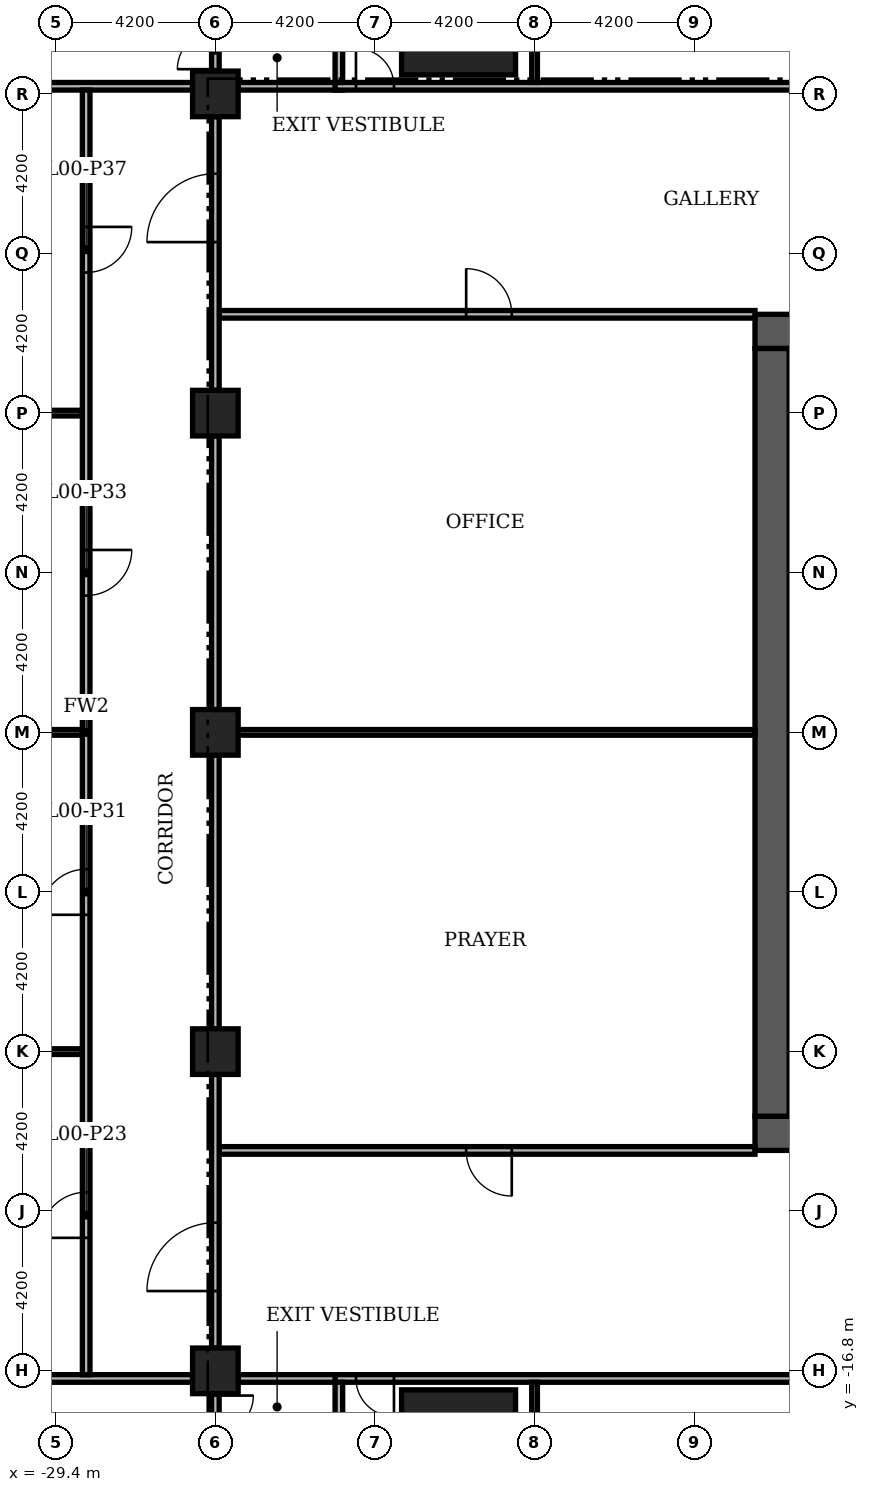
"""IFC4 building model, lengths in metres.
Left out: names, types, materials, properties, quantities, classifications, styles, units other than length and angle.
Written with IfcOpenShell. Run it as: python <this file> out.ifc"""

import sys

from ifc_helpers import new_model, si_unit, direction, frame, frame_2d, origin, origin_2d, place, context, subcontext, project, spatial, rectangle, extrude, element, fill, save


model = new_model("IFC4")
c1 = context("Model", 3, precision=1e-05, world=origin(), true_north=direction((0.0, 1.0)))
c2 = subcontext(c1, "Body", "Model", "MODEL_VIEW")
j1 = project(units=[si_unit("LENGTHUNIT", "METRE"), si_unit("PLANEANGLEUNIT", "RADIAN")], contexts=[c1])
p1 = place(None, origin())
s1 = spatial("IfcSite", under=j1, at=p1, CompositionType="ELEMENT")
p2 = place(p1, origin())
s2 = spatial("IfcBuilding", under=s1, at=p2, CompositionType="ELEMENT")
p3 = place(p2, origin())
s3 = spatial("IfcBuildingStorey", under=s2, at=p3, CompositionType="ELEMENT", Elevation=0.0)
p4 = place(p3, frame((-11.0, -10.55, 0.0), z_axis=(0.0, 0.0, 1.0), x_axis=(1.0, 0.0, 0.0)))
e1 = element("IfcWall", 1, at=p4, inside=s3, PredefinedType="SHEAR", context=c2, shape_type="SweptSolid", body=[
    extrude(rectangle(XDim=22.0, YDim=0.9, at=frame_2d((11.0, 0.0))), origin(), (0.0, 0.0, 1.0), 6.78),
])
p5 = place(p4, frame((7.4, 0.0, 0.0)))
e2 = element("IfcOpeningElement", 2, at=p5, cuts=e1, PredefinedType="OPENING", context=c2, shape_type="SweptSolid", body=[
    extrude(rectangle(XDim=1.8, YDim=2.2, at=frame_2d((0.9, 1.1))), frame((0.0, 0.46, 0.0), z_axis=(0.0, -1.0, 0.0), x_axis=(1.0, 0.0, 0.0)), (0.0, 0.0, 1.0), 0.92),
])
p6 = place(p3, frame((-11.0, 10.55, 0.0), z_axis=(0.0, 0.0, 1.0), x_axis=(1.0, 0.0, 0.0)))
e3 = element("IfcWall", 3, at=p6, inside=s3, PredefinedType="SHEAR", context=c2, shape_type="SweptSolid", body=[
    extrude(rectangle(XDim=22.0, YDim=0.9, at=frame_2d((11.0, 0.0))), origin(), (0.0, 0.0, 1.0), 6.78),
])
p7 = place(p6, frame((12.6, 0.0, 0.0)))
e4 = element("IfcOpeningElement", 4, at=p7, cuts=e3, PredefinedType="OPENING", context=c2, shape_type="SweptSolid", body=[
    extrude(rectangle(XDim=1.2, YDim=2.2, at=frame_2d((0.6, 1.1))), frame((0.0, 0.46, 0.0), z_axis=(0.0, -1.0, 0.0), x_axis=(1.0, 0.0, 0.0)), (0.0, 0.0, 1.0), 0.92),
])
p8 = place(p6, frame((14.8, 0.0, 0.0)))
e5 = element("IfcOpeningElement", 5, at=p8, cuts=e3, PredefinedType="OPENING", context=c2, shape_type="SweptSolid", body=[
    extrude(rectangle(XDim=1.2, YDim=2.2, at=frame_2d((0.6, 1.1))), frame((0.0, 0.46, 0.0), z_axis=(0.0, -1.0, 0.0), x_axis=(1.0, 0.0, 0.0)), (0.0, 0.0, 1.0), 0.92),
])
p9 = place(p3, frame((-10.55, -10.1, 0.0), z_axis=(0.0, 0.0, 1.0), x_axis=(0.0, 1.0, 0.0)))
e6 = element("IfcWall", 6, at=p9, inside=s3, PredefinedType="SHEAR", context=c2, shape_type="SweptSolid", body=[
    extrude(rectangle(XDim=20.2, YDim=0.9, at=frame_2d((10.1, 0.0))), origin(), (0.0, 0.0, 1.0), 6.78),
])
for number, where, z_axis, x_axis in (
    (7, (-18.8, 18.8, 0.0), (0.0, 0.0, 1.0), (1.0, 0.0, 0.0)),
    (8, (-18.8, -18.8, 0.0), (0.0, 0.0, 1.0), (1.0, 0.0, 0.0)),
):
    element("IfcColumn", number, at=place(p3, frame(where, z_axis=z_axis, x_axis=x_axis)), inside=s3, PredefinedType="COLUMN", context=c2, shape_type="SweptSolid", body=[
        extrude(rectangle(XDim=3.0, YDim=3.0, at=origin_2d()), origin(), (0.0, 0.0, 1.0), 7.2),
    ])
for number, where, z_axis, x_axis in (
    (9, (-25.2, 0.0, 0.0), (0.0, 0.0, 1.0), (1.0, 0.0, 0.0)),
    (10, (-25.2, -8.4, 0.0), (0.0, 0.0, 1.0), (1.0, 0.0, 0.0)),
    (11, (-25.2, -16.8, 0.0), (0.0, 0.0, 1.0), (1.0, 0.0, 0.0)),
    (12, (-25.2, 8.4, 0.0), (0.0, 0.0, 1.0), (1.0, 0.0, 0.0)),
    (13, (-25.2, 16.8, 0.0), (0.0, 0.0, 1.0), (1.0, 0.0, 0.0)),
):
    element("IfcColumn", number, at=place(p3, frame(where, z_axis=z_axis, x_axis=x_axis)), inside=s3, PredefinedType="COLUMN", context=c2, shape_type="SweptSolid", body=[
        extrude(rectangle(XDim=1.2, YDim=1.2, at=origin_2d()), origin(), (0.0, 0.0, 1.0), 7.2),
    ])
p10 = place(p3, frame((-33.0, -17.0, 0.0), z_axis=(0.0, 0.0, 1.0), x_axis=(1.0, 0.0, 0.0)))
e14 = element("IfcWall", 14, at=p10, inside=s3, PredefinedType="PARTITIONING", context=c2, shape_type="SweptSolid", body=[
    extrude(rectangle(XDim=7.2, YDim=0.2, at=frame_2d((3.6, 0.0))), origin(), (0.0, 0.0, 1.0), 6.48),
])
p11 = place(p3, frame((-24.6, -17.0, 0.0), z_axis=(0.0, 0.0, 1.0), x_axis=(1.0, 0.0, 0.0)))
e15 = element("IfcWall", 15, at=p11, inside=s3, PredefinedType="PARTITIONING", context=c2, shape_type="SweptSolid", body=[
    extrude(rectangle(XDim=2.75, YDim=0.2, at=frame_2d((1.375, 0.0))), origin(), (0.0, 0.0, 1.0), 6.78),
])
p12 = place(p3, frame((-22.05, -17.0, 0.0), z_axis=(0.0, 0.0, 1.0), x_axis=(1.0, 0.0, 0.0)))
e16 = element("IfcWall", 16, at=p12, inside=s3, PredefinedType="PARTITIONING", context=c2, shape_type="SweptSolid", body=[
    extrude(rectangle(XDim=44.1, YDim=0.2, at=frame_2d((22.05, 0.0))), origin(), (0.0, 0.0, 1.0), 6.78),
])
p13 = place(p12, frame((0.55, 0.0, 0.0)))
e17 = element("IfcOpeningElement", 17, at=p13, cuts=e16, PredefinedType="OPENING", context=c2, shape_type="SweptSolid", body=[
    extrude(rectangle(XDim=1.0, YDim=2.1, at=frame_2d((0.5, 1.05))), frame((0.0, 0.11, 0.0), z_axis=(0.0, -1.0, 0.0), x_axis=(1.0, 0.0, 0.0)), (0.0, 0.0, 1.0), 0.22),
])
p14 = place(p12, frame((12.85, 0.0, 0.0)))
e18 = element("IfcOpeningElement", 18, at=p14, cuts=e16, PredefinedType="OPENING", context=c2, shape_type="SweptSolid", body=[
    extrude(rectangle(XDim=2.4, YDim=2.4, at=frame_2d((1.2, 1.2))), frame((0.0, 0.11, 0.0), z_axis=(0.0, -1.0, 0.0), x_axis=(1.0, 0.0, 0.0)), (0.0, 0.0, 1.0), 0.22),
])
p15 = place(p12, frame((28.85, 0.0, 0.0)))
e19 = element("IfcOpeningElement", 19, at=p15, cuts=e16, PredefinedType="OPENING", context=c2, shape_type="SweptSolid", body=[
    extrude(rectangle(XDim=2.4, YDim=2.4, at=frame_2d((1.2, 1.2))), frame((0.0, 0.11, 0.0), z_axis=(0.0, -1.0, 0.0), x_axis=(1.0, 0.0, 0.0)), (0.0, 0.0, 1.0), 0.22),
])
p16 = place(p12, frame((42.55, 0.0, 0.0)))
e20 = element("IfcOpeningElement", 20, at=p16, cuts=e16, PredefinedType="OPENING", context=c2, shape_type="SweptSolid", body=[
    extrude(rectangle(XDim=1.0, YDim=2.1, at=frame_2d((0.5, 1.05))), frame((0.0, 0.11, 0.0), z_axis=(0.0, -1.0, 0.0), x_axis=(1.0, 0.0, 0.0)), (0.0, 0.0, 1.0), 0.22),
])
p17 = place(p3, frame((-25.1, -11.0, 0.0), z_axis=(0.0, 0.0, 1.0), x_axis=(1.0, 0.0, 0.0)))
e21 = element("IfcWall", 21, at=p17, inside=s3, PredefinedType="PARTITIONING", context=c2, shape_type="SweptSolid", body=[
    extrude(rectangle(XDim=14.1, YDim=0.2, at=frame_2d((7.05, 0.0))), origin(), (0.0, 0.0, 1.0), 6.78),
])
p18 = place(p17, frame((6.5, 0.0, 0.0)))
e22 = element("IfcOpeningElement", 22, at=p18, cuts=e21, PredefinedType="OPENING", context=c2, shape_type="SweptSolid", body=[
    extrude(rectangle(XDim=1.2, YDim=2.2, at=frame_2d((0.6, 1.1))), frame((0.0, 0.11, 0.0), z_axis=(0.0, -1.0, 0.0), x_axis=(1.0, 0.0, 0.0)), (0.0, 0.0, 1.0), 0.22),
])
for number, where, z_axis, x_axis in (
    (23, (-33.0, -8.4, 0.0), (0.0, 0.0, 1.0), (1.0, 0.0, 0.0)),
    (24, (-33.0, 0.0, 0.0), (0.0, 0.0, 1.0), (1.0, 0.0, 0.0)),
):
    element("IfcWall", number, at=place(p3, frame(where, z_axis=z_axis, x_axis=x_axis)), inside=s3, PredefinedType="PARTITIONING", context=c2, shape_type="SweptSolid", body=[
        extrude(rectangle(XDim=4.3, YDim=0.15, at=frame_2d((2.15, 0.0))), origin(), (0.0, 0.0, 1.0), 6.48),
    ])
p19 = place(p3, frame((-24.6, 0.0, 0.0), z_axis=(0.0, 0.0, 1.0), x_axis=(1.0, 0.0, 0.0)))
e25 = element("IfcWall", 25, at=p19, inside=s3, PredefinedType="PARTITIONING", context=c2, shape_type="SweptSolid", body=[
    extrude(rectangle(XDim=13.6, YDim=0.15, at=frame_2d((6.8, 0.0))), origin(), (0.0, 0.0, 1.0), 6.78),
])
p20 = place(p3, frame((-33.0, 8.4, 0.0), z_axis=(0.0, 0.0, 1.0), x_axis=(1.0, 0.0, 0.0)))
e26 = element("IfcWall", 26, at=p20, inside=s3, PredefinedType="PARTITIONING", context=c2, shape_type="SweptSolid", body=[
    extrude(rectangle(XDim=4.3, YDim=0.15, at=frame_2d((2.15, 0.0))), origin(), (0.0, 0.0, 1.0), 6.48),
])
p21 = place(p3, frame((-25.1, 11.0, 0.0), z_axis=(0.0, 0.0, 1.0), x_axis=(1.0, 0.0, 0.0)))
e27 = element("IfcWall", 27, at=p21, inside=s3, PredefinedType="PARTITIONING", context=c2, shape_type="SweptSolid", body=[
    extrude(rectangle(XDim=14.1, YDim=0.2, at=frame_2d((7.05, 0.0))), origin(), (0.0, 0.0, 1.0), 6.78),
])
p22 = place(p21, frame((6.5, 0.0, 0.0)))
e28 = element("IfcOpeningElement", 28, at=p22, cuts=e27, PredefinedType="OPENING", context=c2, shape_type="SweptSolid", body=[
    extrude(rectangle(XDim=1.2, YDim=2.2, at=frame_2d((0.6, 1.1))), frame((0.0, 0.11, 0.0), z_axis=(0.0, -1.0, 0.0), x_axis=(1.0, 0.0, 0.0)), (0.0, 0.0, 1.0), 0.22),
])
p23 = place(p3, frame((-33.0, 17.0, 0.0), z_axis=(0.0, 0.0, 1.0), x_axis=(1.0, 0.0, 0.0)))
e29 = element("IfcWall", 29, at=p23, inside=s3, PredefinedType="PARTITIONING", context=c2, shape_type="SweptSolid", body=[
    extrude(rectangle(XDim=7.2, YDim=0.2, at=frame_2d((3.6, 0.0))), origin(), (0.0, 0.0, 1.0), 6.48),
])
p24 = place(p3, frame((-24.6, 17.0, 0.0), z_axis=(0.0, 0.0, 1.0), x_axis=(1.0, 0.0, 0.0)))
e30 = element("IfcWall", 30, at=p24, inside=s3, PredefinedType="PARTITIONING", context=c2, shape_type="SweptSolid", body=[
    extrude(rectangle(XDim=2.75, YDim=0.2, at=frame_2d((1.375, 0.0))), origin(), (0.0, 0.0, 1.0), 6.78),
])
p25 = place(p3, frame((-22.05, 17.0, 0.0), z_axis=(0.0, 0.0, 1.0), x_axis=(1.0, 0.0, 0.0)))
e31 = element("IfcWall", 31, at=p25, inside=s3, PredefinedType="PARTITIONING", context=c2, shape_type="SweptSolid", body=[
    extrude(rectangle(XDim=22.85, YDim=0.2, at=frame_2d((11.425, 0.0))), origin(), (0.0, 0.0, 1.0), 6.78),
])
p26 = place(p25, frame((0.55, 0.0, 0.0)))
e32 = element("IfcOpeningElement", 32, at=p26, cuts=e31, PredefinedType="OPENING", context=c2, shape_type="SweptSolid", body=[
    extrude(rectangle(XDim=1.0, YDim=2.1, at=frame_2d((0.5, 1.05))), frame((0.0, 0.11, 0.0), z_axis=(0.0, -1.0, 0.0), x_axis=(1.0, 0.0, 0.0)), (0.0, 0.0, 1.0), 0.22),
])
p27 = place(p25, frame((13.15, 0.0, 0.0)))
e33 = element("IfcOpeningElement", 33, at=p27, cuts=e31, PredefinedType="OPENING", context=c2, shape_type="SweptSolid", body=[
    extrude(rectangle(XDim=1.8, YDim=2.2, at=frame_2d((0.9, 1.1))), frame((0.0, 0.11, 0.0), z_axis=(0.0, -1.0, 0.0), x_axis=(1.0, 0.0, 0.0)), (0.0, 0.0, 1.0), 0.22),
])
p28 = place(p3, frame((-28.6, -16.9, 0.0), z_axis=(0.0, 0.0, 1.0), x_axis=(0.0, 1.0, 0.0)))
e34 = element("IfcWall", 34, at=p28, inside=s3, PredefinedType="PARTITIONING", context=c2, shape_type="SweptSolid", body=[
    extrude(rectangle(XDim=33.8, YDim=0.2, at=frame_2d((16.9, 0.0))), origin(), (0.0, 0.0, 1.0), 6.48),
])
p29 = place(p28, frame((3.6, 0.0, 0.0)))
e35 = element("IfcOpeningElement", 35, at=p29, cuts=e34, PredefinedType="OPENING", context=c2, shape_type="SweptSolid", body=[
    extrude(rectangle(XDim=1.2, YDim=2.2, at=frame_2d((0.6, 1.1))), frame((0.0, 0.11, 0.0), z_axis=(0.0, -1.0, 0.0), x_axis=(1.0, 0.0, 0.0)), (0.0, 0.0, 1.0), 0.22),
])
p30 = place(p28, frame((12.1, 0.0, 0.0)))
e36 = element("IfcOpeningElement", 36, at=p30, cuts=e34, PredefinedType="OPENING", context=c2, shape_type="SweptSolid", body=[
    extrude(rectangle(XDim=1.2, YDim=2.2, at=frame_2d((0.6, 1.1))), frame((0.0, 0.11, 0.0), z_axis=(0.0, -1.0, 0.0), x_axis=(1.0, 0.0, 0.0)), (0.0, 0.0, 1.0), 0.22),
])
p31 = place(p28, frame((20.5, 0.0, 0.0)))
e37 = element("IfcOpeningElement", 37, at=p31, cuts=e34, PredefinedType="OPENING", context=c2, shape_type="SweptSolid", body=[
    extrude(rectangle(XDim=1.2, YDim=2.2, at=frame_2d((0.6, 1.1))), frame((0.0, 0.11, 0.0), z_axis=(0.0, -1.0, 0.0), x_axis=(1.0, 0.0, 0.0)), (0.0, 0.0, 1.0), 0.22),
])
p32 = place(p28, frame((29.0, 0.0, 0.0)))
e38 = element("IfcOpeningElement", 38, at=p32, cuts=e34, PredefinedType="OPENING", context=c2, shape_type="SweptSolid", body=[
    extrude(rectangle(XDim=1.2, YDim=2.2, at=frame_2d((0.6, 1.1))), frame((0.0, 0.11, 0.0), z_axis=(0.0, -1.0, 0.0), x_axis=(1.0, 0.0, 0.0)), (0.0, 0.0, 1.0), 0.22),
])
p33 = place(p3, frame((-25.2, -18.5, 0.0), z_axis=(0.0, 0.0, 1.0), x_axis=(0.0, 1.0, 0.0)))
e39 = element("IfcWall", 39, at=p33, inside=s3, PredefinedType="PARTITIONING", context=c2, shape_type="SweptSolid", body=[
    extrude(rectangle(XDim=1.1, YDim=0.2, at=frame_2d((0.55, 0.0))), origin(), (0.0, 0.0, 1.0), 6.38),
])
p34 = place(p33, frame((0.05, 0.0, 0.0)))
e40 = element("IfcOpeningElement", 40, at=p34, cuts=e39, PredefinedType="OPENING", context=c2, shape_type="SweptSolid", body=[
    extrude(rectangle(XDim=1.0, YDim=2.2, at=frame_2d((0.5, 1.1))), frame((0.0, 0.11, 0.0), z_axis=(0.0, -1.0, 0.0), x_axis=(1.0, 0.0, 0.0)), (0.0, 0.0, 1.0), 0.22),
])
p35 = place(p3, frame((-25.2, -16.2, 0.0), z_axis=(0.0, 0.0, 1.0), x_axis=(0.0, 1.0, 0.0)))
e41 = element("IfcWall", 41, at=p35, inside=s3, PredefinedType="PARTITIONING", context=c2, shape_type="SweptSolid", body=[
    extrude(rectangle(XDim=7.2, YDim=0.2, at=frame_2d((3.6, 0.0))), origin(), (0.0, 0.0, 1.0), 6.48),
])
p36 = place(p35, frame((1.5, 0.0, 0.0)))
e42 = element("IfcOpeningElement", 42, at=p36, cuts=e41, PredefinedType="OPENING", context=c2, shape_type="SweptSolid", body=[
    extrude(rectangle(XDim=1.8, YDim=2.2, at=frame_2d((0.9, 1.1))), frame((0.0, 0.11, 0.0), z_axis=(0.0, -1.0, 0.0), x_axis=(1.0, 0.0, 0.0)), (0.0, 0.0, 1.0), 0.22),
])
for number, where, z_axis, x_axis in (
    (43, (-25.2, -7.8, 0.0), (0.0, 0.0, 1.0), (0.0, 1.0, 0.0)),
    (44, (-25.2, 0.6, 0.0), (0.0, 0.0, 1.0), (0.0, 1.0, 0.0)),
):
    element("IfcWall", number, at=place(p3, frame(where, z_axis=z_axis, x_axis=x_axis)), inside=s3, PredefinedType="PARTITIONING", context=c2, shape_type="SweptSolid", body=[
        extrude(rectangle(XDim=7.2, YDim=0.2, at=frame_2d((3.6, 0.0))), origin(), (0.0, 0.0, 1.0), 6.48),
    ])
p37 = place(p3, frame((-25.2, 9.0, 0.0), z_axis=(0.0, 0.0, 1.0), x_axis=(0.0, 1.0, 0.0)))
e45 = element("IfcWall", 45, at=p37, inside=s3, PredefinedType="PARTITIONING", context=c2, shape_type="SweptSolid", body=[
    extrude(rectangle(XDim=7.2, YDim=0.2, at=frame_2d((3.6, 0.0))), origin(), (0.0, 0.0, 1.0), 6.48),
])
p38 = place(p37, frame((3.9, 0.0, 0.0)))
e46 = element("IfcOpeningElement", 46, at=p38, cuts=e45, PredefinedType="OPENING", context=c2, shape_type="SweptSolid", body=[
    extrude(rectangle(XDim=1.8, YDim=2.2, at=frame_2d((0.9, 1.1))), frame((0.0, 0.11, 0.0), z_axis=(0.0, -1.0, 0.0), x_axis=(1.0, 0.0, 0.0)), (0.0, 0.0, 1.0), 0.22),
])
p39 = place(p3, frame((-25.2, 17.4, 0.0), z_axis=(0.0, 0.0, 1.0), x_axis=(0.0, 1.0, 0.0)))
e47 = element("IfcWall", 47, at=p39, inside=s3, PredefinedType="PARTITIONING", context=c2, shape_type="SweptSolid", body=[
    extrude(rectangle(XDim=1.1, YDim=0.2, at=frame_2d((0.55, 0.0))), origin(), (0.0, 0.0, 1.0), 6.38),
])
p40 = place(p39, frame((0.05, 0.0, 0.0)))
e48 = element("IfcOpeningElement", 48, at=p40, cuts=e47, PredefinedType="OPENING", context=c2, shape_type="SweptSolid", body=[
    extrude(rectangle(XDim=1.0, YDim=2.2, at=frame_2d((0.5, 1.1))), frame((0.0, 0.11, 0.0), z_axis=(0.0, -1.0, 0.0), x_axis=(1.0, 0.0, 0.0)), (0.0, 0.0, 1.0), 0.22),
])
for number, where, z_axis, x_axis in (
    (49, (-21.95, -18.5, 0.0), (0.0, 0.0, 1.0), (0.0, 1.0, 0.0)),
    (50, (-21.95, 17.1, 0.0), (0.0, 0.0, 1.0), (0.0, 1.0, 0.0)),
):
    element("IfcWall", number, at=place(p3, frame(where, z_axis=z_axis, x_axis=x_axis)), inside=s3, PredefinedType="PARTITIONING", context=c2, shape_type="SweptSolid", body=[
        extrude(rectangle(XDim=1.4, YDim=0.2, at=frame_2d((0.7, 0.0))), origin(), (0.0, 0.0, 1.0), 6.78),
    ])
for number, where, z_axis, x_axis in (
    (51, (-16.8, -24.6, 0.0), (0.0, 0.0, 1.0), (0.0, 1.0, 0.0)),
    (52, (-16.8, 17.1, 0.0), (0.0, 0.0, 1.0), (0.0, 1.0, 0.0)),
):
    element("IfcWall", number, at=place(p3, frame(where, z_axis=z_axis, x_axis=x_axis)), inside=s3, PredefinedType="PARTITIONING", context=c2, shape_type="SweptSolid", body=[
        extrude(rectangle(XDim=7.5, YDim=0.15, at=frame_2d((3.75, 0.0))), origin(), (0.0, 0.0, 1.0), 6.78),
    ])
p41 = place(p34, origin())
e53 = element("IfcDoor", 53, at=p41, inside=s3, OperationType="SINGLE_SWING_RIGHT", PredefinedType="DOOR", context=c2, shape_type="SweptSolid", body=[
    extrude(rectangle(XDim=1.0, YDim=2.2, at=frame_2d((0.5, 1.1))), frame((0.0, 0.025, 0.0), z_axis=(0.0, -1.0, 0.0), x_axis=(1.0, 0.0, 0.0)), (0.0, 0.0, 1.0), 0.05),
])
fill(e40, e53)
p42 = place(p13, origin())
e54 = element("IfcDoor", 54, at=p42, inside=s3, OperationType="SINGLE_SWING_RIGHT", PredefinedType="DOOR", context=c2, shape_type="SweptSolid", body=[
    extrude(rectangle(XDim=1.0, YDim=2.1, at=frame_2d((0.5, 1.05))), frame((0.0, 0.025, 0.0), z_axis=(0.0, -1.0, 0.0), x_axis=(1.0, 0.0, 0.0)), (0.0, 0.0, 1.0), 0.05),
])
fill(e17, e54)
p43 = place(p36, origin())
e55 = element("IfcDoor", 55, at=p43, inside=s3, OperationType="DOUBLE_DOOR_SINGLE_SWING", PredefinedType="DOOR", context=c2, shape_type="SweptSolid", body=[
    extrude(rectangle(XDim=1.8, YDim=2.2, at=frame_2d((0.9, 1.1))), frame((0.0, 0.025, 0.0), z_axis=(0.0, -1.0, 0.0), x_axis=(1.0, 0.0, 0.0)), (0.0, 0.0, 1.0), 0.05),
])
fill(e42, e55)
p44 = place(p29, origin())
e56 = element("IfcDoor", 56, at=p44, inside=s3, OperationType="SINGLE_SWING_LEFT", PredefinedType="DOOR", context=c2, shape_type="SweptSolid", body=[
    extrude(rectangle(XDim=1.2, YDim=2.2, at=frame_2d((0.6, 1.1))), frame((0.0, 0.025, 0.0), z_axis=(0.0, -1.0, 0.0), x_axis=(1.0, 0.0, 0.0)), (0.0, 0.0, 1.0), 0.05),
])
fill(e35, e56)
p45 = place(p18, origin())
e57 = element("IfcDoor", 57, at=p45, inside=s3, OperationType="SINGLE_SWING_RIGHT", PredefinedType="DOOR", context=c2, shape_type="SweptSolid", body=[
    extrude(rectangle(XDim=1.2, YDim=2.2, at=frame_2d((0.6, 1.1))), frame((0.0, 0.025, 0.0), z_axis=(0.0, -1.0, 0.0), x_axis=(1.0, 0.0, 0.0)), (0.0, 0.0, 1.0), 0.05),
])
fill(e22, e57)
p46 = place(p30, origin())
e58 = element("IfcDoor", 58, at=p46, inside=s3, OperationType="SINGLE_SWING_LEFT", PredefinedType="DOOR", context=c2, shape_type="SweptSolid", body=[
    extrude(rectangle(XDim=1.2, YDim=2.2, at=frame_2d((0.6, 1.1))), frame((0.0, 0.025, 0.0), z_axis=(0.0, -1.0, 0.0), x_axis=(1.0, 0.0, 0.0)), (0.0, 0.0, 1.0), 0.05),
])
fill(e36, e58)
p47 = place(p31, origin())
e59 = element("IfcDoor", 59, at=p47, inside=s3, OperationType="SINGLE_SWING_RIGHT", PredefinedType="DOOR", context=c2, shape_type="SweptSolid", body=[
    extrude(rectangle(XDim=1.2, YDim=2.2, at=frame_2d((0.6, 1.1))), frame((0.0, 0.025, 0.0), z_axis=(0.0, -1.0, 0.0), x_axis=(1.0, 0.0, 0.0)), (0.0, 0.0, 1.0), 0.05),
])
fill(e37, e59)
p48 = place(p22, origin())
e60 = element("IfcDoor", 60, at=p48, inside=s3, OperationType="SINGLE_SWING_LEFT", PredefinedType="DOOR", context=c2, shape_type="SweptSolid", body=[
    extrude(rectangle(XDim=1.2, YDim=2.2, at=frame_2d((0.6, 1.1))), frame((0.0, 0.025, 0.0), z_axis=(0.0, -1.0, 0.0), x_axis=(1.0, 0.0, 0.0)), (0.0, 0.0, 1.0), 0.05),
])
fill(e28, e60)
p49 = place(p32, origin())
e61 = element("IfcDoor", 61, at=p49, inside=s3, OperationType="SINGLE_SWING_RIGHT", PredefinedType="DOOR", context=c2, shape_type="SweptSolid", body=[
    extrude(rectangle(XDim=1.2, YDim=2.2, at=frame_2d((0.6, 1.1))), frame((0.0, 0.025, 0.0), z_axis=(0.0, -1.0, 0.0), x_axis=(1.0, 0.0, 0.0)), (0.0, 0.0, 1.0), 0.05),
])
fill(e38, e61)
p50 = place(p38, origin())
e62 = element("IfcDoor", 62, at=p50, inside=s3, OperationType="DOUBLE_DOOR_SINGLE_SWING", PredefinedType="DOOR", context=c2, shape_type="SweptSolid", body=[
    extrude(rectangle(XDim=1.8, YDim=2.2, at=frame_2d((0.9, 1.1))), frame((0.0, 0.025, 0.0), z_axis=(0.0, -1.0, 0.0), x_axis=(1.0, 0.0, 0.0)), (0.0, 0.0, 1.0), 0.05),
])
fill(e46, e62)
p51 = place(p26, origin())
e63 = element("IfcDoor", 63, at=p51, inside=s3, OperationType="SINGLE_SWING_LEFT", PredefinedType="DOOR", context=c2, shape_type="SweptSolid", body=[
    extrude(rectangle(XDim=1.0, YDim=2.1, at=frame_2d((0.5, 1.05))), frame((0.0, 0.025, 0.0), z_axis=(0.0, -1.0, 0.0), x_axis=(1.0, 0.0, 0.0)), (0.0, 0.0, 1.0), 0.05),
])
fill(e32, e63)
p52 = place(p40, origin())
e64 = element("IfcDoor", 64, at=p52, inside=s3, OperationType="SINGLE_SWING_LEFT", PredefinedType="DOOR", context=c2, shape_type="SweptSolid", body=[
    extrude(rectangle(XDim=1.0, YDim=2.2, at=frame_2d((0.5, 1.1))), frame((0.0, 0.025, 0.0), z_axis=(0.0, -1.0, 0.0), x_axis=(1.0, 0.0, 0.0)), (0.0, 0.0, 1.0), 0.05),
])
fill(e48, e64)
save(model, sys.argv[1])
